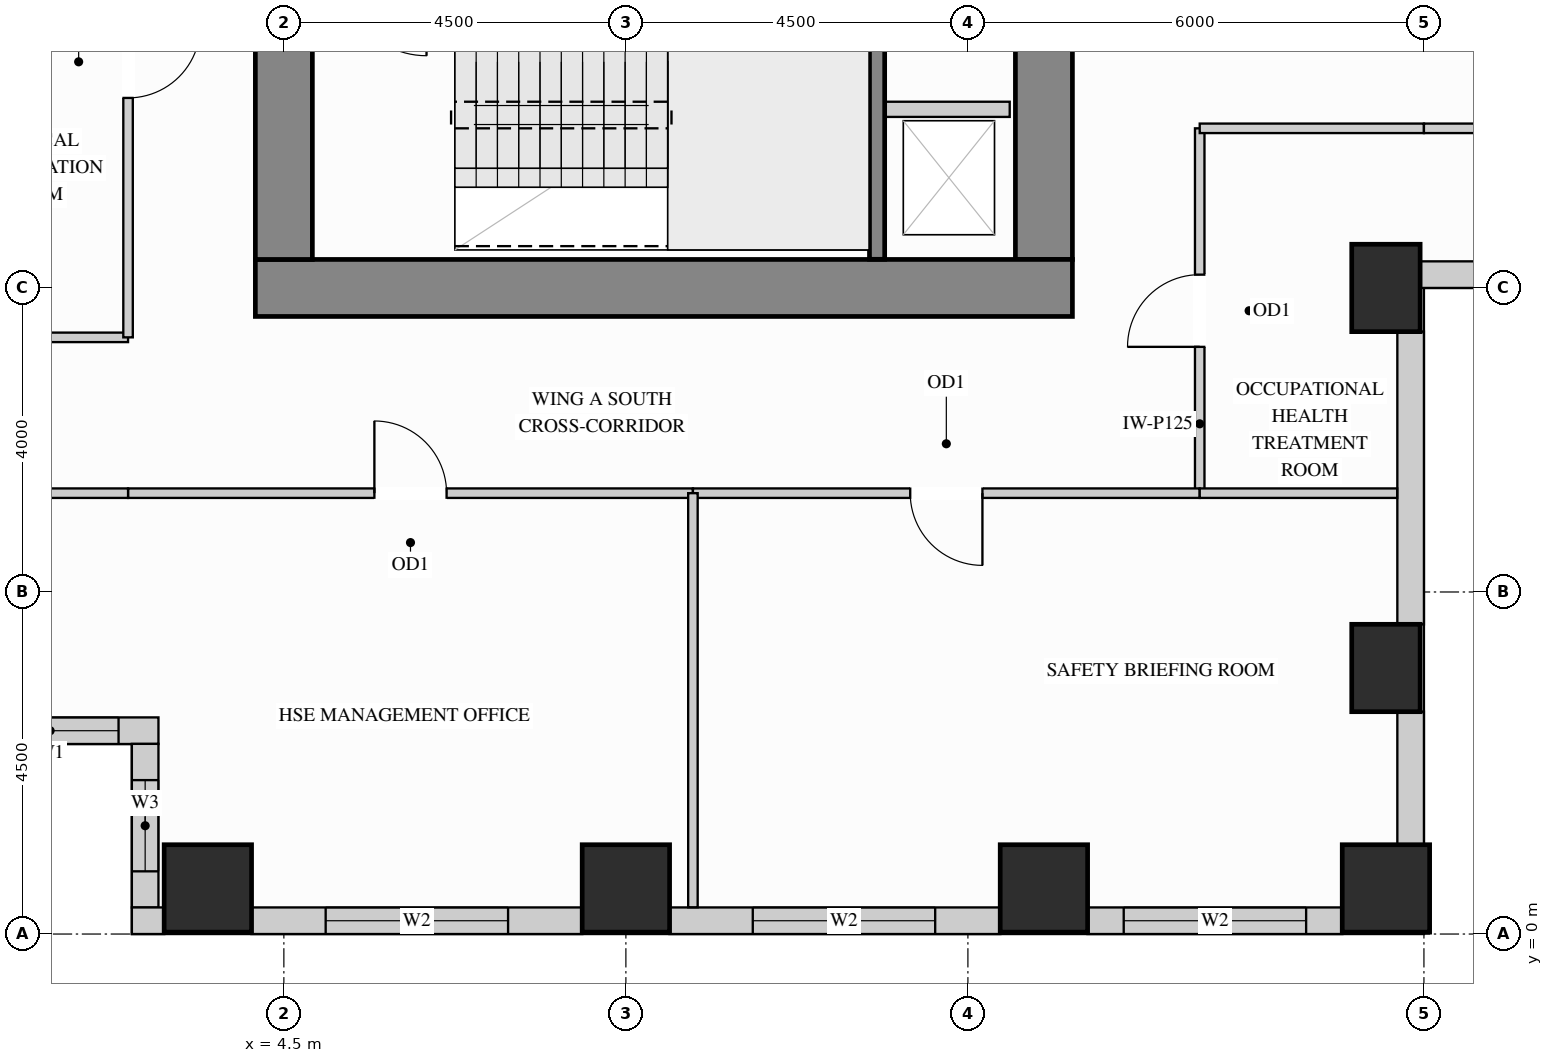
"""IFC4 building model, lengths in metres.
Left out: names, types, materials, properties, quantities, classifications, styles, units other than length and angle.
Written with IfcOpenShell. Run it as: python <this file> out.ifc"""

import sys

from ifc_helpers import new_model, si_unit, direction, frame, frame_2d, origin, origin_2d, place, context, subcontext, project, spatial, rectangle, extrude, source, transform, mapped, element, fill, save


model = new_model("IFC4")
c1 = context("Model", 3, precision=1e-05, world=origin(), true_north=direction((0.0, 1.0)))
c2 = subcontext(c1, "Body", "Model", "MODEL_VIEW")
j1 = project(units=[si_unit("LENGTHUNIT", "METRE"), si_unit("PLANEANGLEUNIT", "RADIAN")], contexts=[c1])
p1 = place(None, origin())
s1 = spatial("IfcSite", under=j1, at=p1, CompositionType="ELEMENT")
p2 = place(p1, origin())
s2 = spatial("IfcBuilding", under=s1, at=p2, CompositionType="ELEMENT")
p3 = place(p2, frame((0.0, 0.0, 117.0)))
s3 = spatial("IfcBuildingStorey", under=s2, at=p3, CompositionType="ELEMENT", Elevation=117.0)
m1 = source(origin(), c2, "Body", "SweptSolid", [
    extrude(rectangle(XDim=0.9, YDim=1.15, at=origin_2d()), origin(), (0.0, 0.0, 1.0), 3.38),
])
for number, where, z_axis, x_axis in (
    (1, (19.0, 3.5, 0.0), (0.0, 0.0, 1.0), (1.0, 0.0, 0.0)),
    (2, (19.0, 8.5, 0.0), (0.0, 0.0, 1.0), (1.0, 0.0, 0.0)),
):
    element("IfcColumn", number, at=place(p3, frame(where, z_axis=z_axis, x_axis=x_axis)), inside=s3, PredefinedType="COLUMN", context=c2, shape_type="MappedRepresentation", body=[
        mapped(m1, transform((0.0, 0.0, 0.0), x_axis=(1.0, 0.0, 0.0), y_axis=(0.0, 1.0, 0.0), z_axis=(0.0, 0.0, 1.0))),
    ])
m2 = source(origin(), c2, "Body", "SweptSolid", [
    extrude(rectangle(XDim=1.15, YDim=1.15, at=origin_2d()), origin(), (0.0, 0.0, 1.0), 3.38),
])
for number, where, z_axis, x_axis in (
    (3, (14.5, 0.6, 0.0), (0.0, 0.0, 1.0), (1.0, 0.0, 0.0)),
    (4, (19.0, 0.6, 0.0), (0.0, 0.0, 1.0), (1.0, 0.0, 0.0)),
    (5, (3.5, 0.6, 0.0), (0.0, 0.0, 1.0), (1.0, 0.0, 0.0)),
    (6, (9.0, 0.6, 0.0), (0.0, 0.0, 1.0), (1.0, 0.0, 0.0)),
):
    element("IfcColumn", number, at=place(p3, frame(where, z_axis=z_axis, x_axis=x_axis)), inside=s3, PredefinedType="COLUMN", context=c2, shape_type="MappedRepresentation", body=[
        mapped(m2, transform((0.0, 0.0, 0.0), x_axis=(1.0, 0.0, 0.0), y_axis=(0.0, 1.0, 0.0), z_axis=(0.0, 0.0, 1.0))),
    ])
m3 = source(origin(), c2, "Body", "SweptSolid", [
    extrude(rectangle(XDim=9.945, YDim=0.75, at=frame_2d((4.973, 0.0))), origin(), (0.0, 0.0, 1.0), 3.38),
])
p4 = place(p3, frame((14.5, 8.875, 0.0), z_axis=(0.0, 0.0, 1.0), x_axis=(0.0, 1.0, 0.0)))
e7 = element("IfcWall", 7, at=p4, inside=s3, PredefinedType="SHEAR", context=c2, shape_type="MappedRepresentation", body=[
    mapped(m3, transform((0.0, 0.0, 0.0), x_axis=(1.0, 0.0, 0.0), y_axis=(0.0, 1.0, 0.0), z_axis=(0.0, 0.0, 1.0))),
])
m4 = source(origin(), c2, "Body", "SweptSolid", [
    extrude(rectangle(XDim=10.75, YDim=0.75, at=frame_2d((5.375, 0.0))), origin(), (0.0, 0.0, 1.0), 3.38),
])
p5 = place(p3, frame((4.125, 8.5, 0.0), z_axis=(0.0, 0.0, 1.0), x_axis=(1.0, 0.0, 0.0)))
e8 = element("IfcWall", 8, at=p5, inside=s3, PredefinedType="SHEAR", context=c2, shape_type="MappedRepresentation", body=[
    mapped(m4, transform((0.0, 0.0, 0.0), x_axis=(1.0, 0.0, 0.0), y_axis=(0.0, 1.0, 0.0), z_axis=(0.0, 0.0, 1.0))),
])
m5 = source(origin(), c2, "Body", "SweptSolid", [
    extrude(rectangle(XDim=20.25, YDim=0.75, at=frame_2d((10.125, 0.0))), origin(), (0.0, 0.0, 1.0), 3.38),
])
p6 = place(p3, frame((4.5, 8.875, 0.0), z_axis=(0.0, 0.0, 1.0), x_axis=(0.0, 1.0, 0.0)))
e9 = element("IfcWall", 9, at=p6, inside=s3, PredefinedType="SHEAR", context=c2, shape_type="MappedRepresentation", body=[
    mapped(m5, transform((0.0, 0.0, 0.0), x_axis=(1.0, 0.0, 0.0), y_axis=(0.0, 1.0, 0.0), z_axis=(0.0, 0.0, 1.0))),
])
p7 = place(p3, frame((0.0, 2.675, 0.0), z_axis=(0.0, 0.0, 1.0), x_axis=(1.0, 0.0, 0.0)))
e10 = element("IfcWall", 10, at=p7, inside=s3, PredefinedType="SOLIDWALL", context=c2, shape_type="SweptSolid", body=[
    extrude(rectangle(XDim=2.85, YDim=0.35, at=frame_2d((1.425, 0.0))), origin(), (0.0, 0.0, 1.0), 3.365),
])
p8 = place(p7, frame((0.525, 0.0, 0.78)))
e11 = element("IfcOpeningElement", 11, at=p8, cuts=e10, PredefinedType="OPENING", context=c2, shape_type="SweptSolid", body=[
    extrude(rectangle(XDim=1.8, YDim=2.1, at=frame_2d((0.9, 1.05))), frame((0.0, 0.185, 0.0), z_axis=(0.0, -1.0, 0.0), x_axis=(1.0, 0.0, 0.0)), (0.0, 0.0, 1.0), 0.37),
])
p9 = place(p3, frame((2.675, 2.502, 0.0), z_axis=(0.0, 0.0, 1.0), x_axis=(0.0, -1.0, 0.0)))
e12 = element("IfcWall", 12, at=p9, inside=s3, PredefinedType="SOLIDWALL", context=c2, shape_type="SweptSolid", body=[
    extrude(rectangle(XDim=2.154, YDim=0.35, at=frame_2d((1.077, 0.0))), origin(), (0.0, 0.0, 1.0), 3.365),
])
p10 = place(p9, frame((0.477, 0.0, 0.78)))
e13 = element("IfcOpeningElement", 13, at=p10, cuts=e12, PredefinedType="OPENING", context=c2, shape_type="SweptSolid", body=[
    extrude(rectangle(XDim=1.2, YDim=2.1, at=frame_2d((0.6, 1.05))), frame((0.0, 0.185, 0.0), z_axis=(0.0, -1.0, 0.0), x_axis=(1.0, 0.0, 0.0)), (0.0, 0.0, 1.0), 0.37),
])
m6 = source(origin(), c2, "Body", "SweptSolid", [
    extrude(rectangle(XDim=0.427, YDim=0.35, at=frame_2d((0.213, 0.0))), origin(), (0.0, 0.0, 1.0), 3.365),
])
p11 = place(p3, frame((2.5, 0.175, 0.0), z_axis=(0.0, 0.0, 1.0), x_axis=(1.0, 0.0, 0.0)))
e14 = element("IfcWall", 14, at=p11, inside=s3, PredefinedType="SOLIDWALL", context=c2, shape_type="MappedRepresentation", body=[
    mapped(m6, transform((0.0, 0.0, 0.0), x_axis=(1.0, 0.0, 0.0), y_axis=(0.0, 1.0, 0.0), z_axis=(0.0, 0.0, 1.0))),
])
p12 = place(p3, frame((4.073, 0.175, 0.0), z_axis=(0.0, 0.0, 1.0), x_axis=(1.0, 0.0, 0.0)))
e15 = element("IfcWall", 15, at=p12, inside=s3, PredefinedType="SOLIDWALL", context=c2, shape_type="SweptSolid", body=[
    extrude(rectangle(XDim=4.354, YDim=0.35, at=frame_2d((2.177, 0.0))), origin(), (0.0, 0.0, 1.0), 3.365),
])
p13 = place(p12, frame((0.977, 0.0, 0.78)))
e16 = element("IfcOpeningElement", 16, at=p13, cuts=e15, PredefinedType="OPENING", context=c2, shape_type="SweptSolid", body=[
    extrude(rectangle(XDim=2.4, YDim=2.1, at=frame_2d((1.2, 1.05))), frame((0.0, 0.185, 0.0), z_axis=(0.0, -1.0, 0.0), x_axis=(1.0, 0.0, 0.0)), (0.0, 0.0, 1.0), 0.37),
])
p14 = place(p3, frame((9.573, 0.175, 0.0), z_axis=(0.0, 0.0, 1.0), x_axis=(1.0, 0.0, 0.0)))
e17 = element("IfcWall", 17, at=p14, inside=s3, PredefinedType="SOLIDWALL", context=c2, shape_type="SweptSolid", body=[
    extrude(rectangle(XDim=4.354, YDim=0.35, at=frame_2d((2.177, 0.0))), origin(), (0.0, 0.0, 1.0), 3.365),
])
p15 = place(p14, frame((1.096, 0.0, 0.78)))
e18 = element("IfcOpeningElement", 18, at=p15, cuts=e17, PredefinedType="OPENING", context=c2, shape_type="SweptSolid", body=[
    extrude(rectangle(XDim=2.4, YDim=2.1, at=frame_2d((1.2, 1.05))), frame((0.0, 0.185, 0.0), z_axis=(0.0, -1.0, 0.0), x_axis=(1.0, 0.0, 0.0)), (0.0, 0.0, 1.0), 0.37),
])
p16 = place(p3, frame((15.073, 0.175, 0.0), z_axis=(0.0, 0.0, 1.0), x_axis=(1.0, 0.0, 0.0)))
e19 = element("IfcWall", 19, at=p16, inside=s3, PredefinedType="SOLIDWALL", context=c2, shape_type="SweptSolid", body=[
    extrude(rectangle(XDim=3.354, YDim=0.35, at=frame_2d((1.677, 0.0))), origin(), (0.0, 0.0, 1.0), 3.365),
])
p17 = place(p16, frame((0.477, 0.0, 0.78)))
e20 = element("IfcOpeningElement", 20, at=p17, cuts=e19, PredefinedType="OPENING", context=c2, shape_type="SweptSolid", body=[
    extrude(rectangle(XDim=2.4, YDim=2.1, at=frame_2d((1.2, 1.05))), frame((0.0, 0.185, 0.0), z_axis=(0.0, -1.0, 0.0), x_axis=(1.0, 0.0, 0.0)), (0.0, 0.0, 1.0), 0.37),
])
m7 = source(origin(), c2, "Body", "SweptSolid", [
    extrude(rectangle(XDim=1.754, YDim=0.35, at=frame_2d((0.877, 0.0))), origin(), (0.0, 0.0, 1.0), 2.519),
])
p18 = place(p3, frame((19.325, 1.173, 0.0), z_axis=(0.0, 0.0, 1.0), x_axis=(0.0, 1.0, 0.0)))
e21 = element("IfcWall", 21, at=p18, inside=s3, PredefinedType="SOLIDWALL", context=c2, shape_type="MappedRepresentation", body=[
    mapped(m7, transform((0.0, 0.0, 0.0), x_axis=(1.0, 0.0, 0.0), y_axis=(0.0, 1.0, 0.0), z_axis=(0.0, 0.0, 1.0))),
])
m8 = source(origin(), c2, "Body", "SweptSolid", [
    extrude(rectangle(XDim=3.854, YDim=0.35, at=frame_2d((1.927, 0.0))), origin(), (0.0, 0.0, 1.0), 2.519),
])
p19 = place(p3, frame((19.325, 4.073, 0.0), z_axis=(0.0, 0.0, 1.0), x_axis=(0.0, 1.0, 0.0)))
e22 = element("IfcWall", 22, at=p19, inside=s3, PredefinedType="SOLIDWALL", context=c2, shape_type="MappedRepresentation", body=[
    mapped(m8, transform((0.0, 0.0, 0.0), x_axis=(1.0, 0.0, 0.0), y_axis=(0.0, 1.0, 0.0), z_axis=(0.0, 0.0, 1.0))),
])
p20 = place(p3, frame((19.448, 8.675, 0.0), z_axis=(0.0, 0.0, 1.0), x_axis=(1.0, 0.0, 0.0)))
e23 = element("IfcWall", 23, at=p20, inside=s3, PredefinedType="SOLIDWALL", context=c2, shape_type="SweptSolid", body=[
    extrude(rectangle(XDim=3.504, YDim=0.35, at=frame_2d((1.752, 0.0))), origin(), (0.0, 0.0, 1.0), 3.365),
])
p21 = place(p20, frame((1.002, 0.0, 0.78)))
e24 = element("IfcOpeningElement", 24, at=p21, cuts=e23, PredefinedType="OPENING", context=c2, shape_type="SweptSolid", body=[
    extrude(rectangle(XDim=1.5, YDim=2.0, at=frame_2d((0.75, 1.0))), frame((0.0, 0.185, 0.0), z_axis=(0.0, -1.0, 0.0), x_axis=(1.0, 0.0, 0.0)), (0.0, 0.0, 1.0), 0.37),
])
p22 = place(p3, frame((16.55, 5.8, 0.0), z_axis=(0.0, 0.0, 1.0), x_axis=(0.0, 1.0, 0.0)))
e25 = element("IfcWall", 25, at=p22, inside=s3, PredefinedType="PARTITIONING", context=c2, shape_type="SweptSolid", body=[
    extrude(rectangle(XDim=4.8, YDim=0.125, at=frame_2d((2.4, 0.0))), origin(), (0.0, 0.0, 1.0), 3.365),
])
p23 = place(p22, frame((1.925, 0.0, 0.0)))
e26 = element("IfcOpeningElement", 26, at=p23, cuts=e25, PredefinedType="OPENING", context=c2, shape_type="SweptSolid", body=[
    extrude(rectangle(XDim=0.95, YDim=2.15, at=frame_2d((0.475, 1.075))), frame((0.0, 0.073, 0.0), z_axis=(0.0, -1.0, 0.0), x_axis=(1.0, 0.0, 0.0)), (0.0, 0.0, 1.0), 0.145),
])
m9 = source(origin(), c2, "Body", "SweptSolid", [
    extrude(rectangle(XDim=2.098, YDim=0.125, at=frame_2d((1.049, 0.0))), origin(), (0.0, 0.0, 1.0), 3.365),
])
p24 = place(p3, frame((0.352, 7.85, 0.0), z_axis=(0.0, 0.0, 1.0), x_axis=(1.0, 0.0, 0.0)))
e27 = element("IfcWall", 27, at=p24, inside=s3, PredefinedType="PARTITIONING", context=c2, shape_type="MappedRepresentation", body=[
    mapped(m9, transform((0.0, 0.0, 0.0), x_axis=(1.0, 0.0, 0.0), y_axis=(0.0, 1.0, 0.0), z_axis=(0.0, 0.0, 1.0))),
])
m10 = source(origin(), c2, "Body", "SweptSolid", [
    extrude(rectangle(XDim=2.95, YDim=0.125, at=frame_2d((1.475, 0.0))), origin(), (0.0, 0.0, 1.0), 3.365),
])
p25 = place(p3, frame((16.55, 10.6, 0.0), z_axis=(0.0, 0.0, 1.0), x_axis=(1.0, 0.0, 0.0)))
e28 = element("IfcWall", 28, at=p25, inside=s3, PredefinedType="PARTITIONING", context=c2, shape_type="MappedRepresentation", body=[
    mapped(m10, transform((0.0, 0.0, 0.0), x_axis=(1.0, 0.0, 0.0), y_axis=(0.0, 1.0, 0.0), z_axis=(0.0, 0.0, 1.0))),
])
p26 = place(p3, frame((19.5, 10.6, 0.0), z_axis=(0.0, 0.0, 1.0), x_axis=(1.0, 0.0, 0.0)))
e29 = element("IfcWall", 29, at=p26, inside=s3, PredefinedType="PARTITIONING", context=c2, shape_type="SweptSolid", body=[
    extrude(rectangle(XDim=14.9, YDim=0.125, at=frame_2d((7.45, 0.0))), origin(), (0.0, 0.0, 1.0), 3.365),
])
p27 = place(p26, frame((6.975, 0.0, 0.0)))
e30 = element("IfcOpeningElement", 30, at=p27, cuts=e29, PredefinedType="OPENING", context=c2, shape_type="SweptSolid", body=[
    extrude(rectangle(XDim=0.95, YDim=2.15, at=frame_2d((0.475, 1.075))), frame((0.0, 0.073, 0.0), z_axis=(0.0, -1.0, 0.0), x_axis=(1.0, 0.0, 0.0)), (0.0, 0.0, 1.0), 0.145),
])
p28 = place(p3, frame((2.45, 5.8, 0.0), z_axis=(0.0, 0.0, 1.0), x_axis=(1.0, 0.0, 0.0)))
e31 = element("IfcWall", 31, at=p28, inside=s3, PredefinedType="PARTITIONING", context=c2, shape_type="SweptSolid", body=[
    extrude(rectangle(XDim=7.432, YDim=0.125, at=frame_2d((3.716, 0.0))), origin(), (0.0, 0.0, 1.0), 3.365),
])
p29 = place(p28, frame((3.241, 0.0, 0.0)))
e32 = element("IfcOpeningElement", 32, at=p29, cuts=e31, PredefinedType="OPENING", context=c2, shape_type="SweptSolid", body=[
    extrude(rectangle(XDim=0.95, YDim=2.15, at=frame_2d((0.475, 1.075))), frame((0.0, 0.073, 0.0), z_axis=(0.0, -1.0, 0.0), x_axis=(1.0, 0.0, 0.0)), (0.0, 0.0, 1.0), 0.145),
])
p30 = place(p3, frame((9.882, 5.8, 0.0), z_axis=(0.0, 0.0, 1.0), x_axis=(1.0, 0.0, 0.0)))
e33 = element("IfcWall", 33, at=p30, inside=s3, PredefinedType="PARTITIONING", context=c2, shape_type="SweptSolid", body=[
    extrude(rectangle(XDim=6.668, YDim=0.125, at=frame_2d((3.334, 0.0))), origin(), (0.0, 0.0, 1.0), 3.365),
])
p31 = place(p30, frame((2.859, 0.0, 0.0)))
e34 = element("IfcOpeningElement", 34, at=p31, cuts=e33, PredefinedType="OPENING", context=c2, shape_type="SweptSolid", body=[
    extrude(rectangle(XDim=0.95, YDim=2.15, at=frame_2d((0.475, 1.075))), frame((0.0, 0.073, 0.0), z_axis=(0.0, -1.0, 0.0), x_axis=(1.0, 0.0, 0.0)), (0.0, 0.0, 1.0), 0.145),
])
p32 = place(p3, frame((0.352, 5.8, 0.0), z_axis=(0.0, 0.0, 1.0), x_axis=(1.0, 0.0, 0.0)))
e35 = element("IfcWall", 35, at=p32, inside=s3, PredefinedType="PARTITIONING", context=c2, shape_type="MappedRepresentation", body=[
    mapped(m9, transform((0.0, 0.0, 0.0), x_axis=(1.0, 0.0, 0.0), y_axis=(0.0, 1.0, 0.0), z_axis=(0.0, 0.0, 1.0))),
])
m11 = source(origin(), c2, "Body", "SweptSolid", [
    extrude(rectangle(XDim=2.598, YDim=0.125, at=frame_2d((1.299, 0.0))), origin(), (0.0, 0.0, 1.0), 3.365),
])
p33 = place(p3, frame((16.55, 5.8, 0.0), z_axis=(0.0, 0.0, 1.0), x_axis=(1.0, 0.0, 0.0)))
e36 = element("IfcWall", 36, at=p33, inside=s3, PredefinedType="PARTITIONING", context=c2, shape_type="MappedRepresentation", body=[
    mapped(m11, transform((0.0, 0.0, 0.0), x_axis=(1.0, 0.0, 0.0), y_axis=(0.0, 1.0, 0.0), z_axis=(0.0, 0.0, 1.0))),
])
m12 = source(origin(), c2, "Body", "SweptSolid", [
    extrude(rectangle(XDim=5.448, YDim=0.125, at=frame_2d((2.724, 0.0))), origin(), (0.0, 0.0, 1.0), 3.365),
])
p34 = place(p3, frame((9.882, 0.352, 0.0), z_axis=(0.0, 0.0, 1.0), x_axis=(0.0, 1.0, 0.0)))
e37 = element("IfcWall", 37, at=p34, inside=s3, PredefinedType="PARTITIONING", context=c2, shape_type="MappedRepresentation", body=[
    mapped(m12, transform((0.0, 0.0, 0.0), x_axis=(1.0, 0.0, 0.0), y_axis=(0.0, 1.0, 0.0), z_axis=(0.0, 0.0, 1.0))),
])
p35 = place(p3, frame((2.45, 7.85, 0.0), z_axis=(0.0, 0.0, 1.0), x_axis=(0.0, 1.0, 0.0)))
e38 = element("IfcWall", 38, at=p35, inside=s3, PredefinedType="PARTITIONING", context=c2, shape_type="SweptSolid", body=[
    extrude(rectangle(XDim=7.25, YDim=0.125, at=frame_2d((3.625, 0.0))), origin(), (0.0, 0.0, 1.0), 3.365),
])
p36 = place(p35, frame((3.15, 0.0, 0.0)))
e39 = element("IfcOpeningElement", 39, at=p36, cuts=e38, PredefinedType="OPENING", context=c2, shape_type="SweptSolid", body=[
    extrude(rectangle(XDim=0.95, YDim=2.15, at=frame_2d((0.475, 1.075))), frame((0.0, 0.073, 0.0), z_axis=(0.0, -1.0, 0.0), x_axis=(1.0, 0.0, 0.0)), (0.0, 0.0, 1.0), 0.145),
])
m13 = source(origin(), c2, "Body", "SweptSolid", [
    extrude(rectangle(XDim=1.63, YDim=0.2, at=frame_2d((0.815, 0.0))), origin(), (0.0, 0.0, 1.0), 3.365),
])
p37 = place(p3, frame((12.42, 10.85, 0.0), z_axis=(0.0, 0.0, 1.0), x_axis=(1.0, 0.0, 0.0)))
e40 = element("IfcWall", 40, at=p37, inside=s3, PredefinedType="PARTITIONING", context=c2, shape_type="MappedRepresentation", body=[
    mapped(m13, transform((0.0, 0.0, 0.0), x_axis=(1.0, 0.0, 0.0), y_axis=(0.0, 1.0, 0.0), z_axis=(0.0, 0.0, 1.0))),
])
m14 = source(origin(), c2, "Body", "SweptSolid", [
    extrude(rectangle(XDim=3.678, YDim=0.2, at=frame_2d((1.839, 0.0))), origin(), (0.0, 0.0, 1.0), 3.38),
])
p38 = place(p3, frame((12.305, 8.877, 0.0), z_axis=(0.0, 0.0, 1.0), x_axis=(0.0, 1.0, 0.0)))
e41 = element("IfcWall", 41, at=p38, inside=s3, PredefinedType="SHEAR", context=c2, shape_type="MappedRepresentation", body=[
    mapped(m14, transform((0.0, 0.0, 0.0), x_axis=(1.0, 0.0, 0.0), y_axis=(0.0, 1.0, 0.0), z_axis=(0.0, 0.0, 1.0))),
])
m15 = source(origin(), c2, "Body", "SweptSolid", [
    extrude(rectangle(XDim=0.95, YDim=2.15, at=frame_2d((0.475, 1.075))), frame((0.0, 0.025, 0.0), z_axis=(0.0, -1.0, 0.0), x_axis=(1.0, 0.0, 0.0)), (0.0, 0.0, 1.0), 0.05),
])
p39 = place(p23, origin())
e42 = element("IfcDoor", 42, at=p39, inside=s3, OperationType="SINGLE_SWING_LEFT", PredefinedType="DOOR", context=c2, shape_type="MappedRepresentation", body=[
    mapped(m15, transform((0.0, 0.0, 0.0), x_axis=(1.0, 0.0, 0.0), y_axis=(0.0, 1.0, 0.0), z_axis=(0.0, 0.0, 1.0))),
])
fill(e26, e42)
p40 = place(p29, origin())
e43 = element("IfcDoor", 43, at=p40, inside=s3, OperationType="SINGLE_SWING_LEFT", PredefinedType="DOOR", context=c2, shape_type="MappedRepresentation", body=[
    mapped(m15, transform((0.0, 0.0, 0.0), x_axis=(1.0, 0.0, 0.0), y_axis=(0.0, 1.0, 0.0), z_axis=(0.0, 0.0, 1.0))),
])
fill(e32, e43)
p41 = place(p31, origin())
e44 = element("IfcDoor", 44, at=p41, inside=s3, OperationType="SINGLE_SWING_RIGHT", PredefinedType="DOOR", context=c2, shape_type="MappedRepresentation", body=[
    mapped(m15, transform((0.0, 0.0, 0.0), x_axis=(1.0, 0.0, 0.0), y_axis=(0.0, 1.0, 0.0), z_axis=(0.0, 0.0, 1.0))),
])
fill(e34, e44)
p42 = place(p36, origin())
e45 = element("IfcDoor", 45, at=p42, inside=s3, OperationType="SINGLE_SWING_RIGHT", PredefinedType="DOOR", context=c2, shape_type="MappedRepresentation", body=[
    mapped(m15, transform((0.0, 0.0, 0.0), x_axis=(1.0, 0.0, 0.0), y_axis=(0.0, 1.0, 0.0), z_axis=(0.0, 0.0, 1.0))),
])
fill(e39, e45)
m16 = source(origin(), c2, "Body", "SweptSolid", [
    extrude(rectangle(XDim=1.8, YDim=2.1, at=frame_2d((0.9, 1.05))), frame((0.0, 0.03, 0.0), z_axis=(0.0, -1.0, 0.0), x_axis=(1.0, 0.0, 0.0)), (0.0, 0.0, 1.0), 0.06),
])
p43 = place(p8, origin())
e46 = element("IfcWindow", 46, at=p43, inside=s3, PartitioningType="SINGLE_PANEL", PredefinedType="WINDOW", context=c2, shape_type="MappedRepresentation", body=[
    mapped(m16, transform((0.0, 0.0, 0.0), x_axis=(1.0, 0.0, 0.0), y_axis=(0.0, 1.0, 0.0), z_axis=(0.0, 0.0, 1.0))),
])
fill(e11, e46)
m17 = source(origin(), c2, "Body", "SweptSolid", [
    extrude(rectangle(XDim=2.4, YDim=2.1, at=frame_2d((1.2, 1.05))), frame((0.0, 0.03, 0.0), z_axis=(0.0, -1.0, 0.0), x_axis=(1.0, 0.0, 0.0)), (0.0, 0.0, 1.0), 0.06),
])
p44 = place(p13, origin())
e47 = element("IfcWindow", 47, at=p44, inside=s3, PartitioningType="SINGLE_PANEL", PredefinedType="WINDOW", context=c2, shape_type="MappedRepresentation", body=[
    mapped(m17, transform((0.0, 0.0, 0.0), x_axis=(1.0, 0.0, 0.0), y_axis=(0.0, 1.0, 0.0), z_axis=(0.0, 0.0, 1.0))),
])
fill(e16, e47)
p45 = place(p15, origin())
e48 = element("IfcWindow", 48, at=p45, inside=s3, PartitioningType="SINGLE_PANEL", PredefinedType="WINDOW", context=c2, shape_type="MappedRepresentation", body=[
    mapped(m17, transform((0.0, 0.0, 0.0), x_axis=(1.0, 0.0, 0.0), y_axis=(0.0, 1.0, 0.0), z_axis=(0.0, 0.0, 1.0))),
])
fill(e18, e48)
p46 = place(p17, origin())
e49 = element("IfcWindow", 49, at=p46, inside=s3, PartitioningType="SINGLE_PANEL", PredefinedType="WINDOW", context=c2, shape_type="MappedRepresentation", body=[
    mapped(m17, transform((0.0, 0.0, 0.0), x_axis=(1.0, 0.0, 0.0), y_axis=(0.0, 1.0, 0.0), z_axis=(0.0, 0.0, 1.0))),
])
fill(e20, e49)
m18 = source(origin(), c2, "Body", "SweptSolid", [
    extrude(rectangle(XDim=1.2, YDim=2.1, at=frame_2d((0.6, 1.05))), frame((0.0, 0.03, 0.0), z_axis=(0.0, -1.0, 0.0), x_axis=(1.0, 0.0, 0.0)), (0.0, 0.0, 1.0), 0.06),
])
p47 = place(p10, origin())
e50 = element("IfcWindow", 50, at=p47, inside=s3, PartitioningType="SINGLE_PANEL", PredefinedType="WINDOW", context=c2, shape_type="MappedRepresentation", body=[
    mapped(m18, transform((0.0, 0.0, 0.0), x_axis=(1.0, 0.0, 0.0), y_axis=(0.0, 1.0, 0.0), z_axis=(0.0, 0.0, 1.0))),
])
fill(e13, e50)
save(model, sys.argv[1])
